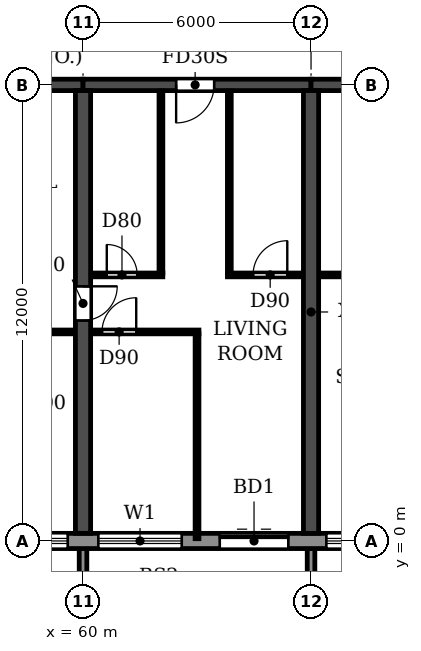
"""IFC4 building model, lengths in metres.
Left out: names, types, materials, properties, quantities, classifications, styles, units other than length and angle.
Written with IfcOpenShell. Run it as: python <this file> out.ifc"""

import sys

from ifc_helpers import new_model, si_unit, direction, frame, frame_2d, origin, place, context, subcontext, project, spatial, polyline, rectangle, outline, extrude, source, transform, mapped, element, fill, save


model = new_model("IFC4")
c1 = context("Model", 3, precision=1e-05, world=origin(), true_north=direction((0.0, 1.0)))
c2 = subcontext(c1, "Body", "Model", "MODEL_VIEW")
j1 = project(units=[si_unit("LENGTHUNIT", "METRE"), si_unit("PLANEANGLEUNIT", "RADIAN")], contexts=[c1])
p1 = place(None, origin())
s1 = spatial("IfcSite", under=j1, at=p1, CompositionType="ELEMENT")
p2 = place(p1, origin())
s2 = spatial("IfcBuilding", under=s1, at=p2, CompositionType="ELEMENT")
p3 = place(p2, frame((0.0, 0.0, 23.4)))
s3 = spatial("IfcBuildingStorey", under=s2, at=p3, CompositionType="ELEMENT", Elevation=23.4)
p4 = place(p3, frame((60.0, 0.2, 0.0), z_axis=(0.0, 0.0, 1.0), x_axis=(0.0, 1.0, 0.0)))
e1 = element("IfcWall", 1, at=p4, inside=s3, PredefinedType="SHEAR", context=c2, shape_type="SweptSolid", body=[
    extrude(rectangle(XDim=11.65, YDim=0.4, at=frame_2d((5.825, 0.0))), origin(), (0.0, 0.0, 1.0), 3.05),
])
p5 = place(p4, frame((5.6, 0.0, 0.0)))
e2 = element("IfcOpeningElement", 2, at=p5, cuts=e1, PredefinedType="OPENING", context=c2, shape_type="SweptSolid", body=[
    extrude(rectangle(XDim=0.9, YDim=2.1, at=frame_2d((0.45, 1.05))), frame((0.0, 0.21, 0.0), z_axis=(0.0, -1.0, 0.0), x_axis=(1.0, 0.0, 0.0)), (0.0, 0.0, 1.0), 0.42),
])
p6 = place(p3, frame((66.0, 0.2, 0.0), z_axis=(0.0, 0.0, 1.0), x_axis=(0.0, 1.0, 0.0)))
e3 = element("IfcWall", 3, at=p6, inside=s3, PredefinedType="SHEAR", context=c2, shape_type="SweptSolid", body=[
    extrude(rectangle(XDim=11.65, YDim=0.4, at=frame_2d((5.825, 0.0))), origin(), (0.0, 0.0, 1.0), 3.05),
])
p7 = place(p3, frame((54.0, 12.0, 0.0), z_axis=(0.0, 0.0, 1.0), x_axis=(1.0, 0.0, 0.0)))
e4 = element("IfcWall", 4, at=p7, inside=s3, PredefinedType="SHEAR", context=c2, shape_type="SweptSolid", body=[
    extrude(rectangle(XDim=6.0, YDim=0.3, at=frame_2d((3.0, 0.0))), origin(), (0.0, 0.0, 1.0), 2.45),
])
p8 = place(p3, frame((60.0, 12.0, 0.0), z_axis=(0.0, 0.0, 1.0), x_axis=(1.0, 0.0, 0.0)))
e5 = element("IfcWall", 5, at=p8, inside=s3, PredefinedType="SHEAR", context=c2, shape_type="SweptSolid", body=[
    extrude(rectangle(XDim=6.0, YDim=0.3, at=frame_2d((3.0, 0.0))), origin(), (0.0, 0.0, 1.0), 2.45),
])
p9 = place(p8, frame((2.45, 0.0, 0.0)))
e6 = element("IfcOpeningElement", 6, at=p9, cuts=e5, PredefinedType="OPENING", context=c2, shape_type="SweptSolid", body=[
    extrude(rectangle(XDim=1.0, YDim=2.1, at=frame_2d((0.5, 1.05))), frame((0.0, 0.16, 0.0), z_axis=(0.0, -1.0, 0.0), x_axis=(1.0, 0.0, 0.0)), (0.0, 0.0, 1.0), 0.32),
])
p10 = place(p3, frame((66.0, 12.0, 0.0), z_axis=(0.0, 0.0, 1.0), x_axis=(1.0, 0.0, 0.0)))
e7 = element("IfcWall", 7, at=p10, inside=s3, PredefinedType="SHEAR", context=c2, shape_type="SweptSolid", body=[
    extrude(rectangle(XDim=6.0, YDim=0.3, at=frame_2d((3.0, 0.0))), origin(), (0.0, 0.0, 1.0), 2.45),
])
p11 = place(p10, frame((2.45, 0.0, 0.0)))
e8 = element("IfcOpeningElement", 8, at=p11, cuts=e7, PredefinedType="OPENING", context=c2, shape_type="SweptSolid", body=[
    extrude(rectangle(XDim=1.0, YDim=2.1, at=frame_2d((0.5, 1.05))), frame((0.0, 0.16, 0.0), z_axis=(0.0, -1.0, 0.0), x_axis=(1.0, 0.0, 0.0)), (0.0, 0.0, 1.0), 0.32),
])
p12 = place(p3, frame((4.683, 0.0, 0.0), z_axis=(0.0, 0.0, 1.0), x_axis=(1.0, 0.0, 0.0)))
e9 = element("IfcWall", 9, at=p12, inside=s3, PredefinedType="STANDARD", context=c2, shape_type="SweptSolid", body=[
    extrude(rectangle(XDim=92.634, YDim=0.4, at=frame_2d((46.317, 0.0))), origin(), (0.0, 0.0, 1.0), 3.05),
])
p13 = place(p12, frame((1.717, 0.0, 0.9)))
e10 = element("IfcOpeningElement", 10, at=p13, cuts=e9, PredefinedType="OPENING", context=c2, shape_type="SweptSolid", body=[
    extrude(rectangle(XDim=2.2, YDim=1.5, at=frame_2d((1.1, 0.75))), frame((0.0, 0.21, 0.0), z_axis=(0.0, -1.0, 0.0), x_axis=(1.0, 0.0, 0.0)), (0.0, 0.0, 1.0), 0.42),
])
p14 = place(p12, frame((4.717, 0.0, 0.9)))
e11 = element("IfcOpeningElement", 11, at=p14, cuts=e9, PredefinedType="OPENING", context=c2, shape_type="SweptSolid", body=[
    extrude(rectangle(XDim=2.2, YDim=1.5, at=frame_2d((1.1, 0.75))), frame((0.0, 0.21, 0.0), z_axis=(0.0, -1.0, 0.0), x_axis=(1.0, 0.0, 0.0)), (0.0, 0.0, 1.0), 0.42),
])
p15 = place(p12, frame((7.717, 0.0, 0.9)))
e12 = element("IfcOpeningElement", 12, at=p15, cuts=e9, PredefinedType="OPENING", context=c2, shape_type="SweptSolid", body=[
    extrude(rectangle(XDim=2.2, YDim=1.5, at=frame_2d((1.1, 0.75))), frame((0.0, 0.21, 0.0), z_axis=(0.0, -1.0, 0.0), x_axis=(1.0, 0.0, 0.0)), (0.0, 0.0, 1.0), 0.42),
])
p16 = place(p12, frame((10.717, 0.0, 0.9)))
e13 = element("IfcOpeningElement", 13, at=p16, cuts=e9, PredefinedType="OPENING", context=c2, shape_type="SweptSolid", body=[
    extrude(rectangle(XDim=2.2, YDim=1.5, at=frame_2d((1.1, 0.75))), frame((0.0, 0.21, 0.0), z_axis=(0.0, -1.0, 0.0), x_axis=(1.0, 0.0, 0.0)), (0.0, 0.0, 1.0), 0.42),
])
p17 = place(p12, frame((13.717, 0.0, 0.9)))
e14 = element("IfcOpeningElement", 14, at=p17, cuts=e9, PredefinedType="OPENING", context=c2, shape_type="SweptSolid", body=[
    extrude(rectangle(XDim=2.2, YDim=1.5, at=frame_2d((1.1, 0.75))), frame((0.0, 0.21, 0.0), z_axis=(0.0, -1.0, 0.0), x_axis=(1.0, 0.0, 0.0)), (0.0, 0.0, 1.0), 0.42),
])
p18 = place(p12, frame((16.717, 0.0, 0.9)))
e15 = element("IfcOpeningElement", 15, at=p18, cuts=e9, PredefinedType="OPENING", context=c2, shape_type="SweptSolid", body=[
    extrude(rectangle(XDim=2.2, YDim=1.5, at=frame_2d((1.1, 0.75))), frame((0.0, 0.21, 0.0), z_axis=(0.0, -1.0, 0.0), x_axis=(1.0, 0.0, 0.0)), (0.0, 0.0, 1.0), 0.42),
])
p19 = place(p12, frame((19.917, 0.0, 0.0)))
e16 = element("IfcOpeningElement", 16, at=p19, cuts=e9, PredefinedType="OPENING", context=c2, shape_type="SweptSolid", body=[
    extrude(rectangle(XDim=1.8, YDim=2.4, at=frame_2d((0.9, 1.2))), frame((0.0, 0.21, 0.0), z_axis=(0.0, -1.0, 0.0), x_axis=(1.0, 0.0, 0.0)), (0.0, 0.0, 1.0), 0.42),
])
p20 = place(p12, frame((22.717, 0.0, 0.9)))
e17 = element("IfcOpeningElement", 17, at=p20, cuts=e9, PredefinedType="OPENING", context=c2, shape_type="SweptSolid", body=[
    extrude(rectangle(XDim=2.2, YDim=1.5, at=frame_2d((1.1, 0.75))), frame((0.0, 0.21, 0.0), z_axis=(0.0, -1.0, 0.0), x_axis=(1.0, 0.0, 0.0)), (0.0, 0.0, 1.0), 0.42),
])
p21 = place(p12, frame((25.717, 0.0, 0.9)))
e18 = element("IfcOpeningElement", 18, at=p21, cuts=e9, PredefinedType="OPENING", context=c2, shape_type="SweptSolid", body=[
    extrude(rectangle(XDim=2.2, YDim=1.5, at=frame_2d((1.1, 0.75))), frame((0.0, 0.21, 0.0), z_axis=(0.0, -1.0, 0.0), x_axis=(1.0, 0.0, 0.0)), (0.0, 0.0, 1.0), 0.42),
])
p22 = place(p12, frame((28.717, 0.0, 0.9)))
e19 = element("IfcOpeningElement", 19, at=p22, cuts=e9, PredefinedType="OPENING", context=c2, shape_type="SweptSolid", body=[
    extrude(rectangle(XDim=2.2, YDim=1.5, at=frame_2d((1.1, 0.75))), frame((0.0, 0.21, 0.0), z_axis=(0.0, -1.0, 0.0), x_axis=(1.0, 0.0, 0.0)), (0.0, 0.0, 1.0), 0.42),
])
p23 = place(p12, frame((31.917, 0.0, 0.0)))
e20 = element("IfcOpeningElement", 20, at=p23, cuts=e9, PredefinedType="OPENING", context=c2, shape_type="SweptSolid", body=[
    extrude(rectangle(XDim=1.8, YDim=2.4, at=frame_2d((0.9, 1.2))), frame((0.0, 0.21, 0.0), z_axis=(0.0, -1.0, 0.0), x_axis=(1.0, 0.0, 0.0)), (0.0, 0.0, 1.0), 0.42),
])
p24 = place(p12, frame((34.717, 0.0, 0.9)))
e21 = element("IfcOpeningElement", 21, at=p24, cuts=e9, PredefinedType="OPENING", context=c2, shape_type="SweptSolid", body=[
    extrude(rectangle(XDim=2.2, YDim=1.5, at=frame_2d((1.1, 0.75))), frame((0.0, 0.21, 0.0), z_axis=(0.0, -1.0, 0.0), x_axis=(1.0, 0.0, 0.0)), (0.0, 0.0, 1.0), 0.42),
])
p25 = place(p12, frame((37.717, 0.0, 0.9)))
e22 = element("IfcOpeningElement", 22, at=p25, cuts=e9, PredefinedType="OPENING", context=c2, shape_type="SweptSolid", body=[
    extrude(rectangle(XDim=2.2, YDim=1.5, at=frame_2d((1.1, 0.75))), frame((0.0, 0.21, 0.0), z_axis=(0.0, -1.0, 0.0), x_axis=(1.0, 0.0, 0.0)), (0.0, 0.0, 1.0), 0.42),
])
p26 = place(p12, frame((40.717, 0.0, 0.9)))
e23 = element("IfcOpeningElement", 23, at=p26, cuts=e9, PredefinedType="OPENING", context=c2, shape_type="SweptSolid", body=[
    extrude(rectangle(XDim=2.2, YDim=1.5, at=frame_2d((1.1, 0.75))), frame((0.0, 0.21, 0.0), z_axis=(0.0, -1.0, 0.0), x_axis=(1.0, 0.0, 0.0)), (0.0, 0.0, 1.0), 0.42),
])
p27 = place(p12, frame((43.917, 0.0, 0.0)))
e24 = element("IfcOpeningElement", 24, at=p27, cuts=e9, PredefinedType="OPENING", context=c2, shape_type="SweptSolid", body=[
    extrude(rectangle(XDim=1.8, YDim=2.4, at=frame_2d((0.9, 1.2))), frame((0.0, 0.21, 0.0), z_axis=(0.0, -1.0, 0.0), x_axis=(1.0, 0.0, 0.0)), (0.0, 0.0, 1.0), 0.42),
])
p28 = place(p12, frame((46.717, 0.0, 0.9)))
e25 = element("IfcOpeningElement", 25, at=p28, cuts=e9, PredefinedType="OPENING", context=c2, shape_type="SweptSolid", body=[
    extrude(rectangle(XDim=2.2, YDim=1.5, at=frame_2d((1.1, 0.75))), frame((0.0, 0.21, 0.0), z_axis=(0.0, -1.0, 0.0), x_axis=(1.0, 0.0, 0.0)), (0.0, 0.0, 1.0), 0.42),
])
p29 = place(p12, frame((49.717, 0.0, 0.9)))
e26 = element("IfcOpeningElement", 26, at=p29, cuts=e9, PredefinedType="OPENING", context=c2, shape_type="SweptSolid", body=[
    extrude(rectangle(XDim=2.2, YDim=1.5, at=frame_2d((1.1, 0.75))), frame((0.0, 0.21, 0.0), z_axis=(0.0, -1.0, 0.0), x_axis=(1.0, 0.0, 0.0)), (0.0, 0.0, 1.0), 0.42),
])
p30 = place(p12, frame((52.717, 0.0, 0.9)))
e27 = element("IfcOpeningElement", 27, at=p30, cuts=e9, PredefinedType="OPENING", context=c2, shape_type="SweptSolid", body=[
    extrude(rectangle(XDim=2.2, YDim=1.5, at=frame_2d((1.1, 0.75))), frame((0.0, 0.21, 0.0), z_axis=(0.0, -1.0, 0.0), x_axis=(1.0, 0.0, 0.0)), (0.0, 0.0, 1.0), 0.42),
])
p31 = place(p12, frame((55.717, 0.0, 0.9)))
e28 = element("IfcOpeningElement", 28, at=p31, cuts=e9, PredefinedType="OPENING", context=c2, shape_type="SweptSolid", body=[
    extrude(rectangle(XDim=2.2, YDim=1.5, at=frame_2d((1.1, 0.75))), frame((0.0, 0.21, 0.0), z_axis=(0.0, -1.0, 0.0), x_axis=(1.0, 0.0, 0.0)), (0.0, 0.0, 1.0), 0.42),
])
p32 = place(p12, frame((58.917, 0.0, 0.0)))
e29 = element("IfcOpeningElement", 29, at=p32, cuts=e9, PredefinedType="OPENING", context=c2, shape_type="SweptSolid", body=[
    extrude(rectangle(XDim=1.8, YDim=2.4, at=frame_2d((0.9, 1.2))), frame((0.0, 0.21, 0.0), z_axis=(0.0, -1.0, 0.0), x_axis=(1.0, 0.0, 0.0)), (0.0, 0.0, 1.0), 0.42),
])
p33 = place(p12, frame((61.717, 0.0, 0.9)))
e30 = element("IfcOpeningElement", 30, at=p33, cuts=e9, PredefinedType="OPENING", context=c2, shape_type="SweptSolid", body=[
    extrude(rectangle(XDim=2.2, YDim=1.5, at=frame_2d((1.1, 0.75))), frame((0.0, 0.21, 0.0), z_axis=(0.0, -1.0, 0.0), x_axis=(1.0, 0.0, 0.0)), (0.0, 0.0, 1.0), 0.42),
])
p34 = place(p12, frame((64.717, 0.0, 0.9)))
e31 = element("IfcOpeningElement", 31, at=p34, cuts=e9, PredefinedType="OPENING", context=c2, shape_type="SweptSolid", body=[
    extrude(rectangle(XDim=2.2, YDim=1.5, at=frame_2d((1.1, 0.75))), frame((0.0, 0.21, 0.0), z_axis=(0.0, -1.0, 0.0), x_axis=(1.0, 0.0, 0.0)), (0.0, 0.0, 1.0), 0.42),
])
p35 = place(p12, frame((67.717, 0.0, 0.9)))
e32 = element("IfcOpeningElement", 32, at=p35, cuts=e9, PredefinedType="OPENING", context=c2, shape_type="SweptSolid", body=[
    extrude(rectangle(XDim=2.2, YDim=1.5, at=frame_2d((1.1, 0.75))), frame((0.0, 0.21, 0.0), z_axis=(0.0, -1.0, 0.0), x_axis=(1.0, 0.0, 0.0)), (0.0, 0.0, 1.0), 0.42),
])
p36 = place(p12, frame((70.917, 0.0, 0.0)))
e33 = element("IfcOpeningElement", 33, at=p36, cuts=e9, PredefinedType="OPENING", context=c2, shape_type="SweptSolid", body=[
    extrude(rectangle(XDim=1.8, YDim=2.4, at=frame_2d((0.9, 1.2))), frame((0.0, 0.21, 0.0), z_axis=(0.0, -1.0, 0.0), x_axis=(1.0, 0.0, 0.0)), (0.0, 0.0, 1.0), 0.42),
])
p37 = place(p12, frame((73.717, 0.0, 0.9)))
e34 = element("IfcOpeningElement", 34, at=p37, cuts=e9, PredefinedType="OPENING", context=c2, shape_type="SweptSolid", body=[
    extrude(rectangle(XDim=2.2, YDim=1.5, at=frame_2d((1.1, 0.75))), frame((0.0, 0.21, 0.0), z_axis=(0.0, -1.0, 0.0), x_axis=(1.0, 0.0, 0.0)), (0.0, 0.0, 1.0), 0.42),
])
p38 = place(p12, frame((76.717, 0.0, 0.9)))
e35 = element("IfcOpeningElement", 35, at=p38, cuts=e9, PredefinedType="OPENING", context=c2, shape_type="SweptSolid", body=[
    extrude(rectangle(XDim=2.2, YDim=1.5, at=frame_2d((1.1, 0.75))), frame((0.0, 0.21, 0.0), z_axis=(0.0, -1.0, 0.0), x_axis=(1.0, 0.0, 0.0)), (0.0, 0.0, 1.0), 0.42),
])
p39 = place(p12, frame((79.717, 0.0, 0.9)))
e36 = element("IfcOpeningElement", 36, at=p39, cuts=e9, PredefinedType="OPENING", context=c2, shape_type="SweptSolid", body=[
    extrude(rectangle(XDim=2.2, YDim=1.5, at=frame_2d((1.1, 0.75))), frame((0.0, 0.21, 0.0), z_axis=(0.0, -1.0, 0.0), x_axis=(1.0, 0.0, 0.0)), (0.0, 0.0, 1.0), 0.42),
])
p40 = place(p12, frame((82.717, 0.0, 0.9)))
e37 = element("IfcOpeningElement", 37, at=p40, cuts=e9, PredefinedType="OPENING", context=c2, shape_type="SweptSolid", body=[
    extrude(rectangle(XDim=2.2, YDim=1.5, at=frame_2d((1.1, 0.75))), frame((0.0, 0.21, 0.0), z_axis=(0.0, -1.0, 0.0), x_axis=(1.0, 0.0, 0.0)), (0.0, 0.0, 1.0), 0.42),
])
p41 = place(p12, frame((85.717, 0.0, 0.9)))
e38 = element("IfcOpeningElement", 38, at=p41, cuts=e9, PredefinedType="OPENING", context=c2, shape_type="SweptSolid", body=[
    extrude(rectangle(XDim=2.2, YDim=1.5, at=frame_2d((1.1, 0.75))), frame((0.0, 0.21, 0.0), z_axis=(0.0, -1.0, 0.0), x_axis=(1.0, 0.0, 0.0)), (0.0, 0.0, 1.0), 0.42),
])
p42 = place(p12, frame((88.717, 0.0, 0.9)))
e39 = element("IfcOpeningElement", 39, at=p42, cuts=e9, PredefinedType="OPENING", context=c2, shape_type="SweptSolid", body=[
    extrude(rectangle(XDim=2.2, YDim=1.5, at=frame_2d((1.1, 0.75))), frame((0.0, 0.21, 0.0), z_axis=(0.0, -1.0, 0.0), x_axis=(1.0, 0.0, 0.0)), (0.0, 0.0, 1.0), 0.42),
])
m1 = source(origin(), c2, "Body", "SweptSolid", [
    extrude(outline(polyline([(0.0, 0.0), (0.2, 0.0), (0.2, 1.65), (0.0, 1.65), (0.0, 0.0)])), origin(), (0.0, 0.0, 1.0), 3.1),
])
for number, where in (
    (40, (59.9, -1.85, 0.0)),
    (41, (65.9, -1.85, 0.0)),
):
    element("IfcWall", number, at=place(p3, frame(where)), inside=s3, PredefinedType="STANDARD", context=c2, shape_type="MappedRepresentation", body=[
        mapped(m1, transform((0.0, 0.0, 0.0))),
    ])
p43 = place(p3, frame((54.21, 5.5, 0.0), z_axis=(0.0, 0.0, 1.0), x_axis=(1.0, 0.0, 0.0)))
e42 = element("IfcWall", 42, at=p43, inside=s3, PredefinedType="PARTITIONING", context=c2, shape_type="SweptSolid", body=[
    extrude(rectangle(XDim=5.58, YDim=0.1, at=frame_2d((2.79, 0.0))), origin(), (0.0, 0.0, 1.0), 3.05),
])
p44 = place(p43, frame((1.39, 0.0, 0.0)))
e43 = element("IfcOpeningElement", 43, at=p44, cuts=e42, PredefinedType="OPENING", context=c2, shape_type="SweptSolid", body=[
    extrude(rectangle(XDim=0.9, YDim=2.1, at=frame_2d((0.45, 1.05))), frame((0.0, 0.06, 0.0), z_axis=(0.0, -1.0, 0.0), x_axis=(1.0, 0.0, 0.0)), (0.0, 0.0, 1.0), 0.12),
])
p45 = place(p43, frame((3.29, 0.0, 0.0)))
e44 = element("IfcOpeningElement", 44, at=p45, cuts=e42, PredefinedType="OPENING", context=c2, shape_type="SweptSolid", body=[
    extrude(rectangle(XDim=0.9, YDim=2.1, at=frame_2d((0.45, 1.05))), frame((0.0, 0.06, 0.0), z_axis=(0.0, -1.0, 0.0), x_axis=(1.0, 0.0, 0.0)), (0.0, 0.0, 1.0), 0.12),
])
p46 = place(p3, frame((60.21, 5.5, 0.0), z_axis=(0.0, 0.0, 1.0), x_axis=(1.0, 0.0, 0.0)))
e45 = element("IfcWall", 45, at=p46, inside=s3, PredefinedType="PARTITIONING", context=c2, shape_type="SweptSolid", body=[
    extrude(rectangle(XDim=2.84, YDim=0.1, at=frame_2d((1.42, 0.0))), origin(), (0.0, 0.0, 1.0), 3.05),
])
p47 = place(p46, frame((0.29, 0.0, 0.0)))
e46 = element("IfcOpeningElement", 46, at=p47, cuts=e45, PredefinedType="OPENING", context=c2, shape_type="SweptSolid", body=[
    extrude(rectangle(XDim=0.9, YDim=2.1, at=frame_2d((0.45, 1.05))), frame((0.0, 0.06, 0.0), z_axis=(0.0, -1.0, 0.0), x_axis=(1.0, 0.0, 0.0)), (0.0, 0.0, 1.0), 0.12),
])
p48 = place(p3, frame((60.21, 7.0, 0.0), z_axis=(0.0, 0.0, 1.0), x_axis=(1.0, 0.0, 0.0)))
e47 = element("IfcWall", 47, at=p48, inside=s3, PredefinedType="PARTITIONING", context=c2, shape_type="SweptSolid", body=[
    extrude(rectangle(XDim=1.89, YDim=0.1, at=frame_2d((0.945, 0.0))), origin(), (0.0, 0.0, 1.0), 3.05),
])
p49 = place(p48, frame((0.415, 0.0, 0.0)))
e48 = element("IfcOpeningElement", 48, at=p49, cuts=e47, PredefinedType="OPENING", context=c2, shape_type="SweptSolid", body=[
    extrude(rectangle(XDim=0.8, YDim=2.1, at=frame_2d((0.4, 1.05))), frame((0.0, 0.06, 0.0), z_axis=(0.0, -1.0, 0.0), x_axis=(1.0, 0.0, 0.0)), (0.0, 0.0, 1.0), 0.12),
])
p50 = place(p3, frame((63.8, 7.0, 0.0), z_axis=(0.0, 0.0, 1.0), x_axis=(1.0, 0.0, 0.0)))
e49 = element("IfcWall", 49, at=p50, inside=s3, PredefinedType="PARTITIONING", context=c2, shape_type="SweptSolid", body=[
    extrude(rectangle(XDim=1.99, YDim=0.1, at=frame_2d((0.995, 0.0))), origin(), (0.0, 0.0, 1.0), 3.05),
])
p51 = place(p50, frame((0.675, 0.0, 0.0)))
e50 = element("IfcOpeningElement", 50, at=p51, cuts=e49, PredefinedType="OPENING", context=c2, shape_type="SweptSolid", body=[
    extrude(rectangle(XDim=0.9, YDim=2.1, at=frame_2d((0.45, 1.05))), frame((0.0, 0.06, 0.0), z_axis=(0.0, -1.0, 0.0), x_axis=(1.0, 0.0, 0.0)), (0.0, 0.0, 1.0), 0.12),
])
p52 = place(p3, frame((66.21, 7.0, 0.0), z_axis=(0.0, 0.0, 1.0), x_axis=(1.0, 0.0, 0.0)))
e51 = element("IfcWall", 51, at=p52, inside=s3, PredefinedType="PARTITIONING", context=c2, shape_type="SweptSolid", body=[
    extrude(rectangle(XDim=1.89, YDim=0.1, at=frame_2d((0.945, 0.0))), origin(), (0.0, 0.0, 1.0), 3.05),
])
p53 = place(p3, frame((62.05, 7.05, 0.0), z_axis=(0.0, 0.0, 1.0), x_axis=(0.0, 1.0, 0.0)))
e52 = element("IfcWall", 52, at=p53, inside=s3, PredefinedType="PARTITIONING", context=c2, shape_type="SweptSolid", body=[
    extrude(rectangle(XDim=4.79, YDim=0.1, at=frame_2d((2.395, 0.0))), origin(), (0.0, 0.0, 1.0), 3.05),
])
p54 = place(p3, frame((63.0, 0.06, 0.0), z_axis=(0.0, 0.0, 1.0), x_axis=(0.0, 1.0, 0.0)))
e53 = element("IfcWall", 53, at=p54, inside=s3, PredefinedType="PARTITIONING", context=c2, shape_type="SweptSolid", body=[
    extrude(rectangle(XDim=5.39, YDim=0.1, at=frame_2d((2.695, 0.0))), origin(), (0.0, 0.0, 1.0), 3.05),
])
p55 = place(p3, frame((63.85, 7.05, 0.0), z_axis=(0.0, 0.0, 1.0), x_axis=(0.0, 1.0, 0.0)))
e54 = element("IfcWall", 54, at=p55, inside=s3, PredefinedType="PARTITIONING", context=c2, shape_type="SweptSolid", body=[
    extrude(rectangle(XDim=4.79, YDim=0.1, at=frame_2d((2.395, 0.0))), origin(), (0.0, 0.0, 1.0), 3.05),
])
p56 = place(p30, origin())
e55 = element("IfcWindow", 55, at=p56, inside=s3, PartitioningType="DOUBLE_PANEL_HORIZONTAL", PredefinedType="WINDOW", context=c2, shape_type="SweptSolid", body=[
    extrude(rectangle(XDim=2.2, YDim=1.5, at=frame_2d((1.1, 0.75))), frame((0.0, 0.03, 0.0), z_axis=(0.0, -1.0, 0.0), x_axis=(1.0, 0.0, 0.0)), (0.0, 0.0, 1.0), 0.06),
])
fill(e27, e55)
p57 = place(p31, origin())
e56 = element("IfcWindow", 56, at=p57, inside=s3, PartitioningType="DOUBLE_PANEL_HORIZONTAL", PredefinedType="WINDOW", context=c2, shape_type="SweptSolid", body=[
    extrude(rectangle(XDim=2.2, YDim=1.5, at=frame_2d((1.1, 0.75))), frame((0.0, 0.03, 0.0), z_axis=(0.0, -1.0, 0.0), x_axis=(1.0, 0.0, 0.0)), (0.0, 0.0, 1.0), 0.06),
])
fill(e28, e56)
p58 = place(p32, origin())
e57 = element("IfcDoor", 57, at=p58, inside=s3, OperationType="DOUBLE_DOOR_SLIDING", PredefinedType="DOOR", context=c2, shape_type="SweptSolid", body=[
    extrude(rectangle(XDim=1.8, YDim=2.4, at=frame_2d((0.9, 1.2))), frame((0.0, 0.025, 0.0), z_axis=(0.0, -1.0, 0.0), x_axis=(1.0, 0.0, 0.0)), (0.0, 0.0, 1.0), 0.05),
])
fill(e29, e57)
p59 = place(p33, origin())
e58 = element("IfcWindow", 58, at=p59, inside=s3, PartitioningType="DOUBLE_PANEL_HORIZONTAL", PredefinedType="WINDOW", context=c2, shape_type="SweptSolid", body=[
    extrude(rectangle(XDim=2.2, YDim=1.5, at=frame_2d((1.1, 0.75))), frame((0.0, 0.03, 0.0), z_axis=(0.0, -1.0, 0.0), x_axis=(1.0, 0.0, 0.0)), (0.0, 0.0, 1.0), 0.06),
])
fill(e30, e58)
p60 = place(p5, frame((0.9, 0.0, 0.0), z_axis=(0.0, 0.0, 1.0), x_axis=(-1.0, 0.0, 0.0)))
e59 = element("IfcDoor", 59, at=p60, inside=s3, OperationType="SINGLE_SWING_LEFT", PredefinedType="DOOR", context=c2, shape_type="SweptSolid", body=[
    extrude(rectangle(XDim=0.9, YDim=2.1, at=frame_2d((0.45, 1.05))), frame((0.0, 0.025, 0.0), z_axis=(0.0, -1.0, 0.0), x_axis=(1.0, 0.0, 0.0)), (0.0, 0.0, 1.0), 0.05),
])
fill(e2, e59)
p61 = place(p47, origin())
e60 = element("IfcDoor", 60, at=p61, inside=s3, OperationType="SINGLE_SWING_RIGHT", PredefinedType="DOOR", context=c2, shape_type="SweptSolid", body=[
    extrude(rectangle(XDim=0.9, YDim=2.1, at=frame_2d((0.45, 1.05))), frame((0.0, 0.025, 0.0), z_axis=(0.0, -1.0, 0.0), x_axis=(1.0, 0.0, 0.0)), (0.0, 0.0, 1.0), 0.05),
])
fill(e46, e60)
p62 = place(p49, origin())
e61 = element("IfcDoor", 61, at=p62, inside=s3, OperationType="SINGLE_SWING_LEFT", PredefinedType="DOOR", context=c2, shape_type="SweptSolid", body=[
    extrude(rectangle(XDim=0.8, YDim=2.1, at=frame_2d((0.4, 1.05))), frame((0.0, 0.025, 0.0), z_axis=(0.0, -1.0, 0.0), x_axis=(1.0, 0.0, 0.0)), (0.0, 0.0, 1.0), 0.05),
])
fill(e48, e61)
p63 = place(p9, frame((1.0, 0.0, 0.0), z_axis=(0.0, 0.0, 1.0), x_axis=(-1.0, 0.0, 0.0)))
e62 = element("IfcDoor", 62, at=p63, inside=s3, OperationType="SINGLE_SWING_RIGHT", PredefinedType="DOOR", context=c2, shape_type="SweptSolid", body=[
    extrude(rectangle(XDim=1.0, YDim=2.1, at=frame_2d((0.5, 1.05))), frame((0.0, 0.025, 0.0), z_axis=(0.0, -1.0, 0.0), x_axis=(1.0, 0.0, 0.0)), (0.0, 0.0, 1.0), 0.05),
])
fill(e6, e62)
p64 = place(p51, origin())
e63 = element("IfcDoor", 63, at=p64, inside=s3, OperationType="SINGLE_SWING_RIGHT", PredefinedType="DOOR", context=c2, shape_type="SweptSolid", body=[
    extrude(rectangle(XDim=0.9, YDim=2.1, at=frame_2d((0.45, 1.05))), frame((0.0, 0.025, 0.0), z_axis=(0.0, -1.0, 0.0), x_axis=(1.0, 0.0, 0.0)), (0.0, 0.0, 1.0), 0.05),
])
fill(e50, e63)
save(model, sys.argv[1])
